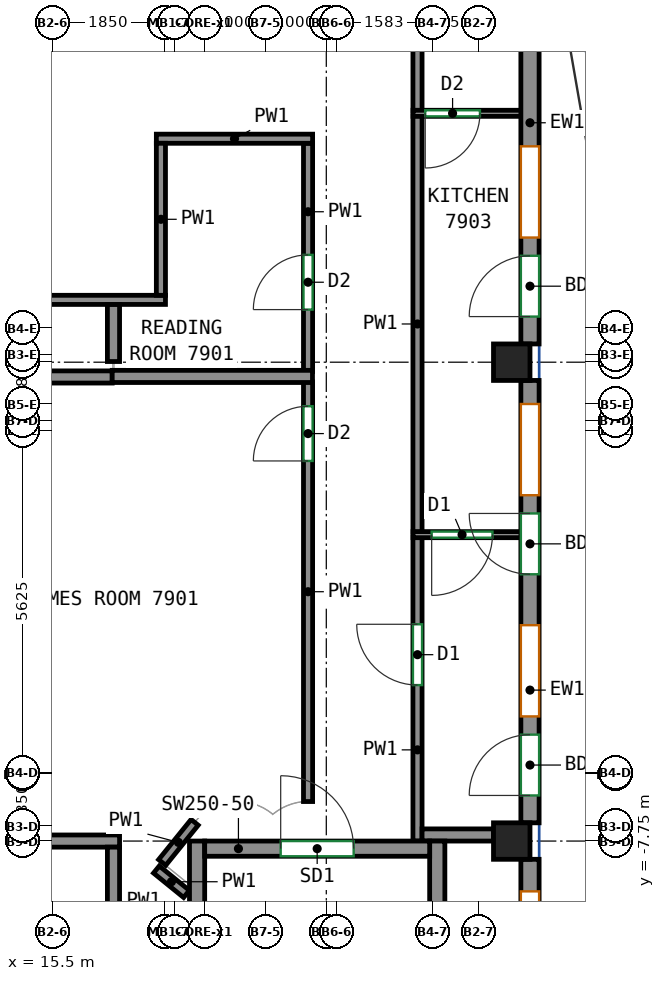
"""IFC4 building model, lengths in metres.
Left out: names, types, materials, properties, quantities, classifications, styles, units other than length and angle.
Written with IfcOpenShell. Run it as: python <this file> out.ifc"""

import sys

from ifc_helpers import new_model, si_unit, direction, frame, frame_2d, origin, origin_2d, place, context, subcontext, project, spatial, rectangle, extrude, source, transform, mapped, element, fill, save


model = new_model("IFC4")
c1 = context("Model", 3, precision=1e-05, world=origin(), true_north=direction((0.0, 1.0)))
c2 = subcontext(c1, "Body", "Model", "MODEL_VIEW")
j1 = project(units=[si_unit("LENGTHUNIT", "METRE"), si_unit("PLANEANGLEUNIT", "RADIAN")], contexts=[c1])
p1 = place(None, origin())
s1 = spatial("IfcSite", under=j1, at=p1, CompositionType="ELEMENT")
p2 = place(p1, origin())
s2 = spatial("IfcBuilding", under=s1, at=p2, CompositionType="ELEMENT")
p3 = place(p2, frame((0.0, 0.0, 315.4)))
s3 = spatial("IfcBuildingStorey", under=s2, at=p3, CompositionType="ELEMENT", Elevation=315.4)
m1 = source(origin(), c2, "Body", "SweptSolid", [
    extrude(rectangle(XDim=0.6, YDim=0.6, at=origin_2d()), origin(), (0.0, 0.0, 1.0), 3.0),
])
for number, where, z_axis, x_axis in (
    (1, (23.05, -7.75, 0.0), (0.0, 0.0, 1.0), (1.0, 0.0, 0.0)),
    (2, (23.05, 0.125, 0.0), (0.0, 0.0, 1.0), (1.0, 0.0, 0.0)),
):
    element("IfcColumn", number, at=place(p3, frame(where, z_axis=z_axis, x_axis=x_axis)), inside=s3, PredefinedType="COLUMN", context=c2, shape_type="MappedRepresentation", body=[
        mapped(m1, transform((0.0, 0.0, 0.0))),
    ])
m2 = source(origin(), c2, "Body", "SweptSolid", [
    extrude(rectangle(XDim=8.0, YDim=0.25, at=frame_2d((4.0, 0.0))), origin(), (0.0, 0.0, 1.0), 3.0),
])
for number, where, z_axis, x_axis in (
    (3, (17.875, -15.75, 0.0), (0.0, 0.0, 1.0), (0.0, 1.0, 0.0)),
    (4, (21.825, -15.75, 0.0), (0.0, 0.0, 1.0), (0.0, 1.0, 0.0)),
):
    element("IfcWall", number, at=place(p3, frame(where, z_axis=z_axis, x_axis=x_axis)), inside=s3, PredefinedType="SHEAR", context=c2, shape_type="MappedRepresentation", body=[
        mapped(m2, transform((0.0, 0.0, 0.0))),
    ])
m3 = source(origin(), c2, "Body", "SweptSolid", [
    extrude(rectangle(XDim=3.7, YDim=0.25, at=frame_2d((1.85, 0.0))), origin(), (0.0, 0.0, 1.0), 3.0),
])
p4 = place(p3, frame((18.0, -7.875, 0.0), z_axis=(0.0, 0.0, 1.0), x_axis=(1.0, 0.0, 0.0)))
e5 = element("IfcWall", 5, at=p4, inside=s3, PredefinedType="SHEAR", context=c2, shape_type="MappedRepresentation", body=[
    mapped(m3, transform((0.0, 0.0, 0.0))),
])
p5 = place(p4, frame((1.25, 0.0, 0.0)))
e6 = element("IfcOpeningElement", 6, at=p5, cuts=e5, PredefinedType="OPENING", context=c2, shape_type="SweptSolid", body=[
    extrude(rectangle(XDim=1.2, YDim=2.1, at=frame_2d((0.6, 1.05))), frame((0.0, 0.135, 0.0), z_axis=(0.0, -1.0, 0.0), x_axis=(1.0, 0.0, 0.0)), (0.0, 0.0, 1.0), 0.27),
])
m4 = source(origin(), c2, "Body", "SweptSolid", [
    extrude(rectangle(XDim=11.332, YDim=0.3, at=frame_2d((5.666, 0.0))), origin(), (0.0, 0.0, 1.0), 3.0),
])
p6 = place(p3, frame((23.35, -19.382, 0.0), z_axis=(0.0, 0.0, 1.0), x_axis=(0.0, 1.0, 0.0)))
e7 = element("IfcWall", 7, at=p6, inside=s3, PredefinedType="SOLIDWALL", context=c2, shape_type="MappedRepresentation", body=[
    mapped(m4, transform((0.0, 0.0, 0.0))),
])
p7 = place(p6, frame((1.75, 0.0, 0.8)))
e8 = element("IfcOpeningElement", 8, at=p7, cuts=e7, PredefinedType="OPENING", context=c2, shape_type="SweptSolid", body=[
    extrude(rectangle(XDim=1.5, YDim=2.05, at=frame_2d((0.75, 1.025))), frame((0.0, 0.16, 0.0), z_axis=(0.0, -1.0, 0.0), x_axis=(1.0, 0.0, 0.0)), (0.0, 0.0, 1.0), 0.32),
])
p8 = place(p6, frame((5.527, 0.0, 0.8)))
e9 = element("IfcOpeningElement", 9, at=p8, cuts=e7, PredefinedType="OPENING", context=c2, shape_type="SweptSolid", body=[
    extrude(rectangle(XDim=1.5, YDim=2.05, at=frame_2d((0.75, 1.025))), frame((0.0, 0.16, 0.0), z_axis=(0.0, -1.0, 0.0), x_axis=(1.0, 0.0, 0.0)), (0.0, 0.0, 1.0), 0.32),
])
p9 = place(p6, frame((9.304, 0.0, 0.8)))
e10 = element("IfcOpeningElement", 10, at=p9, cuts=e7, PredefinedType="OPENING", context=c2, shape_type="SweptSolid", body=[
    extrude(rectangle(XDim=1.5, YDim=2.05, at=frame_2d((0.75, 1.025))), frame((0.0, 0.16, 0.0), z_axis=(0.0, -1.0, 0.0), x_axis=(1.0, 0.0, 0.0)), (0.0, 0.0, 1.0), 0.32),
])
p10 = place(p6, frame((8.004, 0.0, 0.0)))
e11 = element("IfcOpeningElement", 11, at=p10, cuts=e7, PredefinedType="OPENING", context=c2, shape_type="SweptSolid", body=[
    extrude(rectangle(XDim=1.0, YDim=2.1, at=frame_2d((0.5, 1.05))), frame((0.0, 0.16, 0.0), z_axis=(0.0, -1.0, 0.0), x_axis=(1.0, 0.0, 0.0)), (0.0, 0.0, 1.0), 0.32),
])
m5 = source(origin(), c2, "Body", "SweptSolid", [
    extrude(rectangle(XDim=7.275, YDim=0.3, at=frame_2d((3.637, 0.0))), origin(), (0.0, 0.0, 1.0), 3.0),
])
p11 = place(p3, frame((23.35, -7.45, 0.0), z_axis=(0.0, 0.0, 1.0), x_axis=(0.0, 1.0, 0.0)))
e12 = element("IfcWall", 12, at=p11, inside=s3, PredefinedType="SOLIDWALL", context=c2, shape_type="MappedRepresentation", body=[
    mapped(m5, transform((0.0, 0.0, 0.0))),
])
p12 = place(p11, frame((1.75, 0.0, 0.8)))
e13 = element("IfcOpeningElement", 13, at=p12, cuts=e12, PredefinedType="OPENING", context=c2, shape_type="SweptSolid", body=[
    extrude(rectangle(XDim=1.5, YDim=2.05, at=frame_2d((0.75, 1.025))), frame((0.0, 0.16, 0.0), z_axis=(0.0, -1.0, 0.0), x_axis=(1.0, 0.0, 0.0)), (0.0, 0.0, 1.0), 0.32),
])
p13 = place(p11, frame((0.45, 0.0, 0.0)))
e14 = element("IfcOpeningElement", 14, at=p13, cuts=e12, PredefinedType="OPENING", context=c2, shape_type="SweptSolid", body=[
    extrude(rectangle(XDim=1.0, YDim=2.1, at=frame_2d((0.5, 1.05))), frame((0.0, 0.16, 0.0), z_axis=(0.0, -1.0, 0.0), x_axis=(1.0, 0.0, 0.0)), (0.0, 0.0, 1.0), 0.32),
])
p14 = place(p11, frame((5.387, 0.0, 0.8)))
e15 = element("IfcOpeningElement", 15, at=p14, cuts=e12, PredefinedType="OPENING", context=c2, shape_type="SweptSolid", body=[
    extrude(rectangle(XDim=1.5, YDim=2.05, at=frame_2d((0.75, 1.025))), frame((0.0, 0.16, 0.0), z_axis=(0.0, -1.0, 0.0), x_axis=(1.0, 0.0, 0.0)), (0.0, 0.0, 1.0), 0.32),
])
p15 = place(p11, frame((4.087, 0.0, 0.0)))
e16 = element("IfcOpeningElement", 16, at=p15, cuts=e12, PredefinedType="OPENING", context=c2, shape_type="SweptSolid", body=[
    extrude(rectangle(XDim=1.0, YDim=2.1, at=frame_2d((0.5, 1.05))), frame((0.0, 0.16, 0.0), z_axis=(0.0, -1.0, 0.0), x_axis=(1.0, 0.0, 0.0)), (0.0, 0.0, 1.0), 0.32),
])
p16 = place(p3, frame((23.35, 0.425, 0.0), z_axis=(0.0, 0.0, 1.0), x_axis=(0.0, 1.0, 0.0)))
e17 = element("IfcWall", 17, at=p16, inside=s3, PredefinedType="SOLIDWALL", context=c2, shape_type="MappedRepresentation", body=[
    mapped(m5, transform((0.0, 0.0, 0.0))),
])
p17 = place(p16, frame((1.75, 0.0, 0.8)))
e18 = element("IfcOpeningElement", 18, at=p17, cuts=e17, PredefinedType="OPENING", context=c2, shape_type="SweptSolid", body=[
    extrude(rectangle(XDim=1.5, YDim=2.05, at=frame_2d((0.75, 1.025))), frame((0.0, 0.16, 0.0), z_axis=(0.0, -1.0, 0.0), x_axis=(1.0, 0.0, 0.0)), (0.0, 0.0, 1.0), 0.32),
])
p18 = place(p16, frame((0.45, 0.0, 0.0)))
e19 = element("IfcOpeningElement", 19, at=p18, cuts=e17, PredefinedType="OPENING", context=c2, shape_type="SweptSolid", body=[
    extrude(rectangle(XDim=1.0, YDim=2.1, at=frame_2d((0.5, 1.05))), frame((0.0, 0.16, 0.0), z_axis=(0.0, -1.0, 0.0), x_axis=(1.0, 0.0, 0.0)), (0.0, 0.0, 1.0), 0.32),
])
p19 = place(p16, frame((5.387, 0.0, 0.8)))
e20 = element("IfcOpeningElement", 20, at=p19, cuts=e17, PredefinedType="OPENING", context=c2, shape_type="SweptSolid", body=[
    extrude(rectangle(XDim=1.5, YDim=2.05, at=frame_2d((0.75, 1.025))), frame((0.0, 0.16, 0.0), z_axis=(0.0, -1.0, 0.0), x_axis=(1.0, 0.0, 0.0)), (0.0, 0.0, 1.0), 0.32),
])
p20 = place(p3, frame((21.5, -7.75, 0.0), z_axis=(0.0, 0.0, 1.0), x_axis=(0.0, 1.0, 0.0)))
e21 = element("IfcWall", 21, at=p20, inside=s3, PredefinedType="PARTITIONING", context=c2, shape_type="SweptSolid", body=[
    extrude(rectangle(XDim=4.999, YDim=0.15, at=frame_2d((2.5, 0.0))), origin(), (0.0, 0.0, 1.0), 3.0),
])
p21 = place(p20, frame((2.565, 0.0, 0.0)))
e22 = element("IfcOpeningElement", 22, at=p21, cuts=e21, PredefinedType="OPENING", context=c2, shape_type="SweptSolid", body=[
    extrude(rectangle(XDim=1.0, YDim=2.1, at=frame_2d((0.5, 1.05))), frame((0.0, 0.085, 0.0), z_axis=(0.0, -1.0, 0.0), x_axis=(1.0, 0.0, 0.0)), (0.0, 0.0, 1.0), 0.17),
])
p22 = place(p3, frame((21.5, -2.671, 0.0), z_axis=(0.0, 0.0, 1.0), x_axis=(0.0, 1.0, 0.0)))
e23 = element("IfcWall", 23, at=p22, inside=s3, PredefinedType="PARTITIONING", context=c2, shape_type="SweptSolid", body=[
    extrude(rectangle(XDim=6.849, YDim=0.15, at=frame_2d((3.424, 0.0))), origin(), (0.0, 0.0, 1.0), 3.0),
])
p23 = place(p3, frame((21.5, 4.258, 0.0), z_axis=(0.0, 0.0, 1.0), x_axis=(0.0, 1.0, 0.0)))
e24 = element("IfcWall", 24, at=p23, inside=s3, PredefinedType="PARTITIONING", context=c2, shape_type="SweptSolid", body=[
    extrude(rectangle(XDim=14.407, YDim=0.15, at=frame_2d((7.204, 0.0))), origin(), (0.0, 0.0, 1.0), 3.0),
])
p24 = place(p3, frame((6.805, 1.15, 0.0), z_axis=(0.0, 0.0, 1.0), x_axis=(1.0, 0.0, 0.0)))
e25 = element("IfcWall", 25, at=p24, inside=s3, PredefinedType="PARTITIONING", context=c2, shape_type="SweptSolid", body=[
    extrude(rectangle(XDim=10.55, YDim=0.15, at=frame_2d((5.275, 0.0))), origin(), (0.0, 0.0, 1.0), 3.0),
])
p25 = place(p24, frame((6.704, 0.0, 0.0)))
e26 = element("IfcOpeningElement", 26, at=p25, cuts=e25, PredefinedType="OPENING", context=c2, shape_type="SweptSolid", body=[
    extrude(rectangle(XDim=0.9, YDim=2.1, at=frame_2d((0.45, 1.05))), frame((0.0, 0.085, 0.0), z_axis=(0.0, -1.0, 0.0), x_axis=(1.0, 0.0, 0.0)), (0.0, 0.0, 1.0), 0.17),
])
p26 = place(p3, frame((17.206, -8.218, 0.0), z_axis=(0.0, 0.0, 1.0), x_axis=(0.776102288291, -0.630607039376, 0.0)))
e27 = element("IfcWall", 27, at=p26, inside=s3, PredefinedType="PARTITIONING", context=c2, shape_type="SweptSolid", body=[
    extrude(rectangle(XDim=0.638, YDim=0.15, at=frame_2d((0.319, 0.0))), origin(), (0.0, 0.0, 1.0), 3.0),
])
p27 = place(p3, frame((17.835, -7.442, 0.0), z_axis=(0.0, 0.0, 1.0), x_axis=(-0.628859024249, -0.777519342281, 0.0)))
e28 = element("IfcWall", 28, at=p27, inside=s3, PredefinedType="PARTITIONING", context=c2, shape_type="SweptSolid", body=[
    extrude(rectangle(XDim=0.849, YDim=0.15, at=frame_2d((0.425, 0.0))), origin(), (0.0, 0.0, 1.0), 3.0),
])
p28 = place(p3, frame((19.7, -7.1, 0.0), z_axis=(0.0, 0.0, 1.0), x_axis=(0.0, 1.0, 0.0)))
e29 = element("IfcWall", 29, at=p28, inside=s3, PredefinedType="PARTITIONING", context=c2, shape_type="SweptSolid", body=[
    extrude(rectangle(XDim=6.901, YDim=0.15, at=frame_2d((3.451, 0.0))), origin(), (0.0, 0.0, 1.0), 3.0),
])
p29 = place(p28, frame((5.601, 0.0, 0.0)))
e30 = element("IfcOpeningElement", 30, at=p29, cuts=e29, PredefinedType="OPENING", context=c2, shape_type="SweptSolid", body=[
    extrude(rectangle(XDim=0.9, YDim=2.1, at=frame_2d((0.45, 1.05))), frame((0.0, 0.085, 0.0), z_axis=(0.0, -1.0, 0.0), x_axis=(1.0, 0.0, 0.0)), (0.0, 0.0, 1.0), 0.17),
])
p30 = place(p3, frame((19.7, -0.028, 0.0), z_axis=(0.0, 0.0, 1.0), x_axis=(0.0, 1.0, 0.0)))
e31 = element("IfcWall", 31, at=p30, inside=s3, PredefinedType="PARTITIONING", context=c2, shape_type="SweptSolid", body=[
    extrude(rectangle(XDim=3.753, YDim=0.15, at=frame_2d((1.876, 0.0))), origin(), (0.0, 0.0, 1.0), 3.0),
])
p31 = place(p30, frame((1.018, 0.0, 0.0)))
e32 = element("IfcOpeningElement", 32, at=p31, cuts=e31, PredefinedType="OPENING", context=c2, shape_type="SweptSolid", body=[
    extrude(rectangle(XDim=0.9, YDim=2.1, at=frame_2d((0.45, 1.05))), frame((0.0, 0.085, 0.0), z_axis=(0.0, -1.0, 0.0), x_axis=(1.0, 0.0, 0.0)), (0.0, 0.0, 1.0), 0.17),
])
p32 = place(p3, frame((17.205, 3.8, 0.0), z_axis=(0.0, 0.0, 1.0), x_axis=(1.0, 0.0, 0.0)))
e33 = element("IfcWall", 33, at=p32, inside=s3, PredefinedType="PARTITIONING", context=c2, shape_type="SweptSolid", body=[
    extrude(rectangle(XDim=2.57, YDim=0.15, at=frame_2d((1.285, 0.0))), origin(), (0.0, 0.0, 1.0), 3.0),
])
p33 = place(p3, frame((17.28, 1.225, 0.0), z_axis=(0.0, 0.0, 1.0), x_axis=(0.0, 1.0, 0.0)))
e34 = element("IfcWall", 34, at=p33, inside=s3, PredefinedType="PARTITIONING", context=c2, shape_type="SweptSolid", body=[
    extrude(rectangle(XDim=2.5, YDim=0.15, at=frame_2d((1.25, 0.0))), origin(), (0.0, 0.0, 1.0), 3.0),
])
p34 = place(p3, frame((22.75, -7.65, 0.0), z_axis=(0.0, 0.0, 1.0), x_axis=(-1.0, 0.0, 0.0)))
e35 = element("IfcWall", 35, at=p34, inside=s3, PredefinedType="PARTITIONING", context=c2, shape_type="SweptSolid", body=[
    extrude(rectangle(XDim=1.175, YDim=0.2, at=frame_2d((0.587, 0.0))), origin(), (0.0, 0.0, 1.0), 3.0),
])
p35 = place(p3, frame((23.25, -2.711, 0.0), z_axis=(0.0, 0.0, 1.0), x_axis=(-1.0, 0.0, 0.0)))
e36 = element("IfcWall", 36, at=p35, inside=s3, PredefinedType="PARTITIONING", context=c2, shape_type="SweptSolid", body=[
    extrude(rectangle(XDim=1.823, YDim=0.1, at=frame_2d((0.912, 0.0))), origin(), (0.0, 0.0, 1.0), 3.0),
])
p36 = place(p35, frame((0.517, 0.0, 0.0)))
e37 = element("IfcOpeningElement", 37, at=p36, cuts=e36, PredefinedType="OPENING", context=c2, shape_type="SweptSolid", body=[
    extrude(rectangle(XDim=1.0, YDim=2.1, at=frame_2d((0.5, 1.05))), frame((0.0, 0.06, 0.0), z_axis=(0.0, -1.0, 0.0), x_axis=(1.0, 0.0, 0.0)), (0.0, 0.0, 1.0), 0.12),
])
p37 = place(p3, frame((23.25, 4.218, 0.0), z_axis=(0.0, 0.0, 1.0), x_axis=(-1.0, 0.0, 0.0)))
e38 = element("IfcWall", 38, at=p37, inside=s3, PredefinedType="PARTITIONING", context=c2, shape_type="SweptSolid", body=[
    extrude(rectangle(XDim=1.823, YDim=0.1, at=frame_2d((0.912, 0.0))), origin(), (0.0, 0.0, 1.0), 3.0),
])
p38 = place(p37, frame((0.723, 0.0, 0.0)))
e39 = element("IfcOpeningElement", 39, at=p38, cuts=e38, PredefinedType="OPENING", context=c2, shape_type="SweptSolid", body=[
    extrude(rectangle(XDim=0.9, YDim=2.1, at=frame_2d((0.45, 1.05))), frame((0.0, 0.06, 0.0), z_axis=(0.0, -1.0, 0.0), x_axis=(1.0, 0.0, 0.0)), (0.0, 0.0, 1.0), 0.12),
])
p39 = place(p3, frame((16.6, -7.75, 0.0), z_axis=(0.0, 0.0, 1.0), x_axis=(-1.0, 0.0, 0.0)))
e40 = element("IfcWall", 40, at=p39, inside=s3, PredefinedType="PARTITIONING", context=c2, shape_type="SweptSolid", body=[
    extrude(rectangle(XDim=3.175, YDim=0.2, at=frame_2d((1.587, 0.0))), origin(), (0.0, 0.0, 1.0), 3.0),
])
p40 = place(p3, frame((16.5, -10.023, 0.0), z_axis=(0.0, 0.0, 1.0), x_axis=(0.0, 1.0, 0.0)))
e41 = element("IfcWall", 41, at=p40, inside=s3, PredefinedType="PARTITIONING", context=c2, shape_type="SweptSolid", body=[
    extrude(rectangle(XDim=2.173, YDim=0.2, at=frame_2d((1.086, 0.0))), origin(), (0.0, 0.0, 1.0), 3.0),
])
p41 = place(p3, frame((13.425, -0.118, 0.0), z_axis=(0.0, 0.0, 1.0), x_axis=(1.0, 0.0, 0.0)))
e42 = element("IfcWall", 42, at=p41, inside=s3, PredefinedType="PARTITIONING", context=c2, shape_type="SweptSolid", body=[
    extrude(rectangle(XDim=3.054, YDim=0.2, at=frame_2d((1.527, 0.0))), origin(), (0.0, 0.0, 1.0), 3.0),
])
p42 = place(p3, frame((16.5, 0.136, 0.0), z_axis=(0.0, 0.0, 1.0), x_axis=(0.0, 1.0, 0.0)))
e43 = element("IfcWall", 43, at=p42, inside=s3, PredefinedType="PARTITIONING", context=c2, shape_type="SweptSolid", body=[
    extrude(rectangle(XDim=0.937, YDim=0.2, at=frame_2d((0.469, 0.0))), origin(), (0.0, 0.0, 1.0), 3.0),
])
p43 = place(p3, frame((19.773, -0.109, 0.0), z_axis=(0.0, 0.0, 1.0), x_axis=(-1.0, 0.0, 0.0)))
e44 = element("IfcWall", 44, at=p43, inside=s3, PredefinedType="PARTITIONING", context=c2, shape_type="SweptSolid", body=[
    extrude(rectangle(XDim=3.294, YDim=0.2, at=frame_2d((1.647, 0.0))), origin(), (0.0, 0.0, 1.0), 3.0),
])
p44 = place(p9, origin())
e45 = element("IfcWindow", 45, at=p44, inside=s3, PartitioningType="SINGLE_PANEL", PredefinedType="WINDOW", context=c2, shape_type="SweptSolid", body=[
    extrude(rectangle(XDim=1.5, YDim=2.05, at=frame_2d((0.75, 1.025))), frame((0.0, 0.03, 0.0), z_axis=(0.0, -1.0, 0.0), x_axis=(1.0, 0.0, 0.0)), (0.0, 0.0, 1.0), 0.06),
])
fill(e10, e45)
p45 = place(p12, origin())
e46 = element("IfcWindow", 46, at=p45, inside=s3, PartitioningType="SINGLE_PANEL", PredefinedType="WINDOW", context=c2, shape_type="SweptSolid", body=[
    extrude(rectangle(XDim=1.5, YDim=2.05, at=frame_2d((0.75, 1.025))), frame((0.0, 0.03, 0.0), z_axis=(0.0, -1.0, 0.0), x_axis=(1.0, 0.0, 0.0)), (0.0, 0.0, 1.0), 0.06),
])
fill(e13, e46)
p46 = place(p13, origin())
e47 = element("IfcDoor", 47, at=p46, inside=s3, OperationType="SINGLE_SWING_LEFT", PredefinedType="DOOR", context=c2, shape_type="SweptSolid", body=[
    extrude(rectangle(XDim=1.0, YDim=2.1, at=frame_2d((0.5, 1.05))), frame((0.0, 0.025, 0.0), z_axis=(0.0, -1.0, 0.0), x_axis=(1.0, 0.0, 0.0)), (0.0, 0.0, 1.0), 0.05),
])
fill(e14, e47)
p47 = place(p14, origin())
e48 = element("IfcWindow", 48, at=p47, inside=s3, PartitioningType="SINGLE_PANEL", PredefinedType="WINDOW", context=c2, shape_type="SweptSolid", body=[
    extrude(rectangle(XDim=1.5, YDim=2.05, at=frame_2d((0.75, 1.025))), frame((0.0, 0.03, 0.0), z_axis=(0.0, -1.0, 0.0), x_axis=(1.0, 0.0, 0.0)), (0.0, 0.0, 1.0), 0.06),
])
fill(e15, e48)
p48 = place(p15, origin())
e49 = element("IfcDoor", 49, at=p48, inside=s3, OperationType="SINGLE_SWING_RIGHT", PredefinedType="DOOR", context=c2, shape_type="SweptSolid", body=[
    extrude(rectangle(XDim=1.0, YDim=2.1, at=frame_2d((0.5, 1.05))), frame((0.0, 0.025, 0.0), z_axis=(0.0, -1.0, 0.0), x_axis=(1.0, 0.0, 0.0)), (0.0, 0.0, 1.0), 0.05),
])
fill(e16, e49)
p49 = place(p17, origin())
e50 = element("IfcWindow", 50, at=p49, inside=s3, PartitioningType="SINGLE_PANEL", PredefinedType="WINDOW", context=c2, shape_type="SweptSolid", body=[
    extrude(rectangle(XDim=1.5, YDim=2.05, at=frame_2d((0.75, 1.025))), frame((0.0, 0.03, 0.0), z_axis=(0.0, -1.0, 0.0), x_axis=(1.0, 0.0, 0.0)), (0.0, 0.0, 1.0), 0.06),
])
fill(e18, e50)
p50 = place(p18, origin())
e51 = element("IfcDoor", 51, at=p50, inside=s3, OperationType="SINGLE_SWING_LEFT", PredefinedType="DOOR", context=c2, shape_type="SweptSolid", body=[
    extrude(rectangle(XDim=1.0, YDim=2.1, at=frame_2d((0.5, 1.05))), frame((0.0, 0.025, 0.0), z_axis=(0.0, -1.0, 0.0), x_axis=(1.0, 0.0, 0.0)), (0.0, 0.0, 1.0), 0.05),
])
fill(e19, e51)
p51 = place(p5, origin())
e52 = element("IfcDoor", 52, at=p51, inside=s3, OperationType="DOUBLE_DOOR_SINGLE_SWING", PredefinedType="DOOR", context=c2, shape_type="SweptSolid", body=[
    extrude(rectangle(XDim=1.2, YDim=2.1, at=frame_2d((0.6, 1.05))), frame((0.0, 0.025, 0.0), z_axis=(0.0, -1.0, 0.0), x_axis=(1.0, 0.0, 0.0)), (0.0, 0.0, 1.0), 0.05),
])
fill(e6, e52)
p52 = place(p21, origin())
e53 = element("IfcDoor", 53, at=p52, inside=s3, OperationType="SINGLE_SWING_RIGHT", PredefinedType="DOOR", context=c2, shape_type="SweptSolid", body=[
    extrude(rectangle(XDim=1.0, YDim=2.1, at=frame_2d((0.5, 1.05))), frame((0.0, 0.025, 0.0), z_axis=(0.0, -1.0, 0.0), x_axis=(1.0, 0.0, 0.0)), (0.0, 0.0, 1.0), 0.05),
])
fill(e22, e53)
p53 = place(p36, origin())
e54 = element("IfcDoor", 54, at=p53, inside=s3, OperationType="SINGLE_SWING_RIGHT", PredefinedType="DOOR", context=c2, shape_type="SweptSolid", body=[
    extrude(rectangle(XDim=1.0, YDim=2.1, at=frame_2d((0.5, 1.05))), frame((0.0, 0.025, 0.0), z_axis=(0.0, -1.0, 0.0), x_axis=(1.0, 0.0, 0.0)), (0.0, 0.0, 1.0), 0.05),
])
fill(e37, e54)
p54 = place(p29, origin())
e55 = element("IfcDoor", 55, at=p54, inside=s3, OperationType="SINGLE_SWING_LEFT", PredefinedType="DOOR", context=c2, shape_type="SweptSolid", body=[
    extrude(rectangle(XDim=0.9, YDim=2.1, at=frame_2d((0.45, 1.05))), frame((0.0, 0.025, 0.0), z_axis=(0.0, -1.0, 0.0), x_axis=(1.0, 0.0, 0.0)), (0.0, 0.0, 1.0), 0.05),
])
fill(e30, e55)
p55 = place(p31, origin())
e56 = element("IfcDoor", 56, at=p55, inside=s3, OperationType="SINGLE_SWING_LEFT", PredefinedType="DOOR", context=c2, shape_type="SweptSolid", body=[
    extrude(rectangle(XDim=0.9, YDim=2.1, at=frame_2d((0.45, 1.05))), frame((0.0, 0.025, 0.0), z_axis=(0.0, -1.0, 0.0), x_axis=(1.0, 0.0, 0.0)), (0.0, 0.0, 1.0), 0.05),
])
fill(e32, e56)
p56 = place(p38, origin())
e57 = element("IfcDoor", 57, at=p56, inside=s3, OperationType="SINGLE_SWING_RIGHT", PredefinedType="DOOR", context=c2, shape_type="SweptSolid", body=[
    extrude(rectangle(XDim=0.9, YDim=2.1, at=frame_2d((0.45, 1.05))), frame((0.0, 0.025, 0.0), z_axis=(0.0, -1.0, 0.0), x_axis=(1.0, 0.0, 0.0)), (0.0, 0.0, 1.0), 0.05),
])
fill(e39, e57)
save(model, sys.argv[1])
